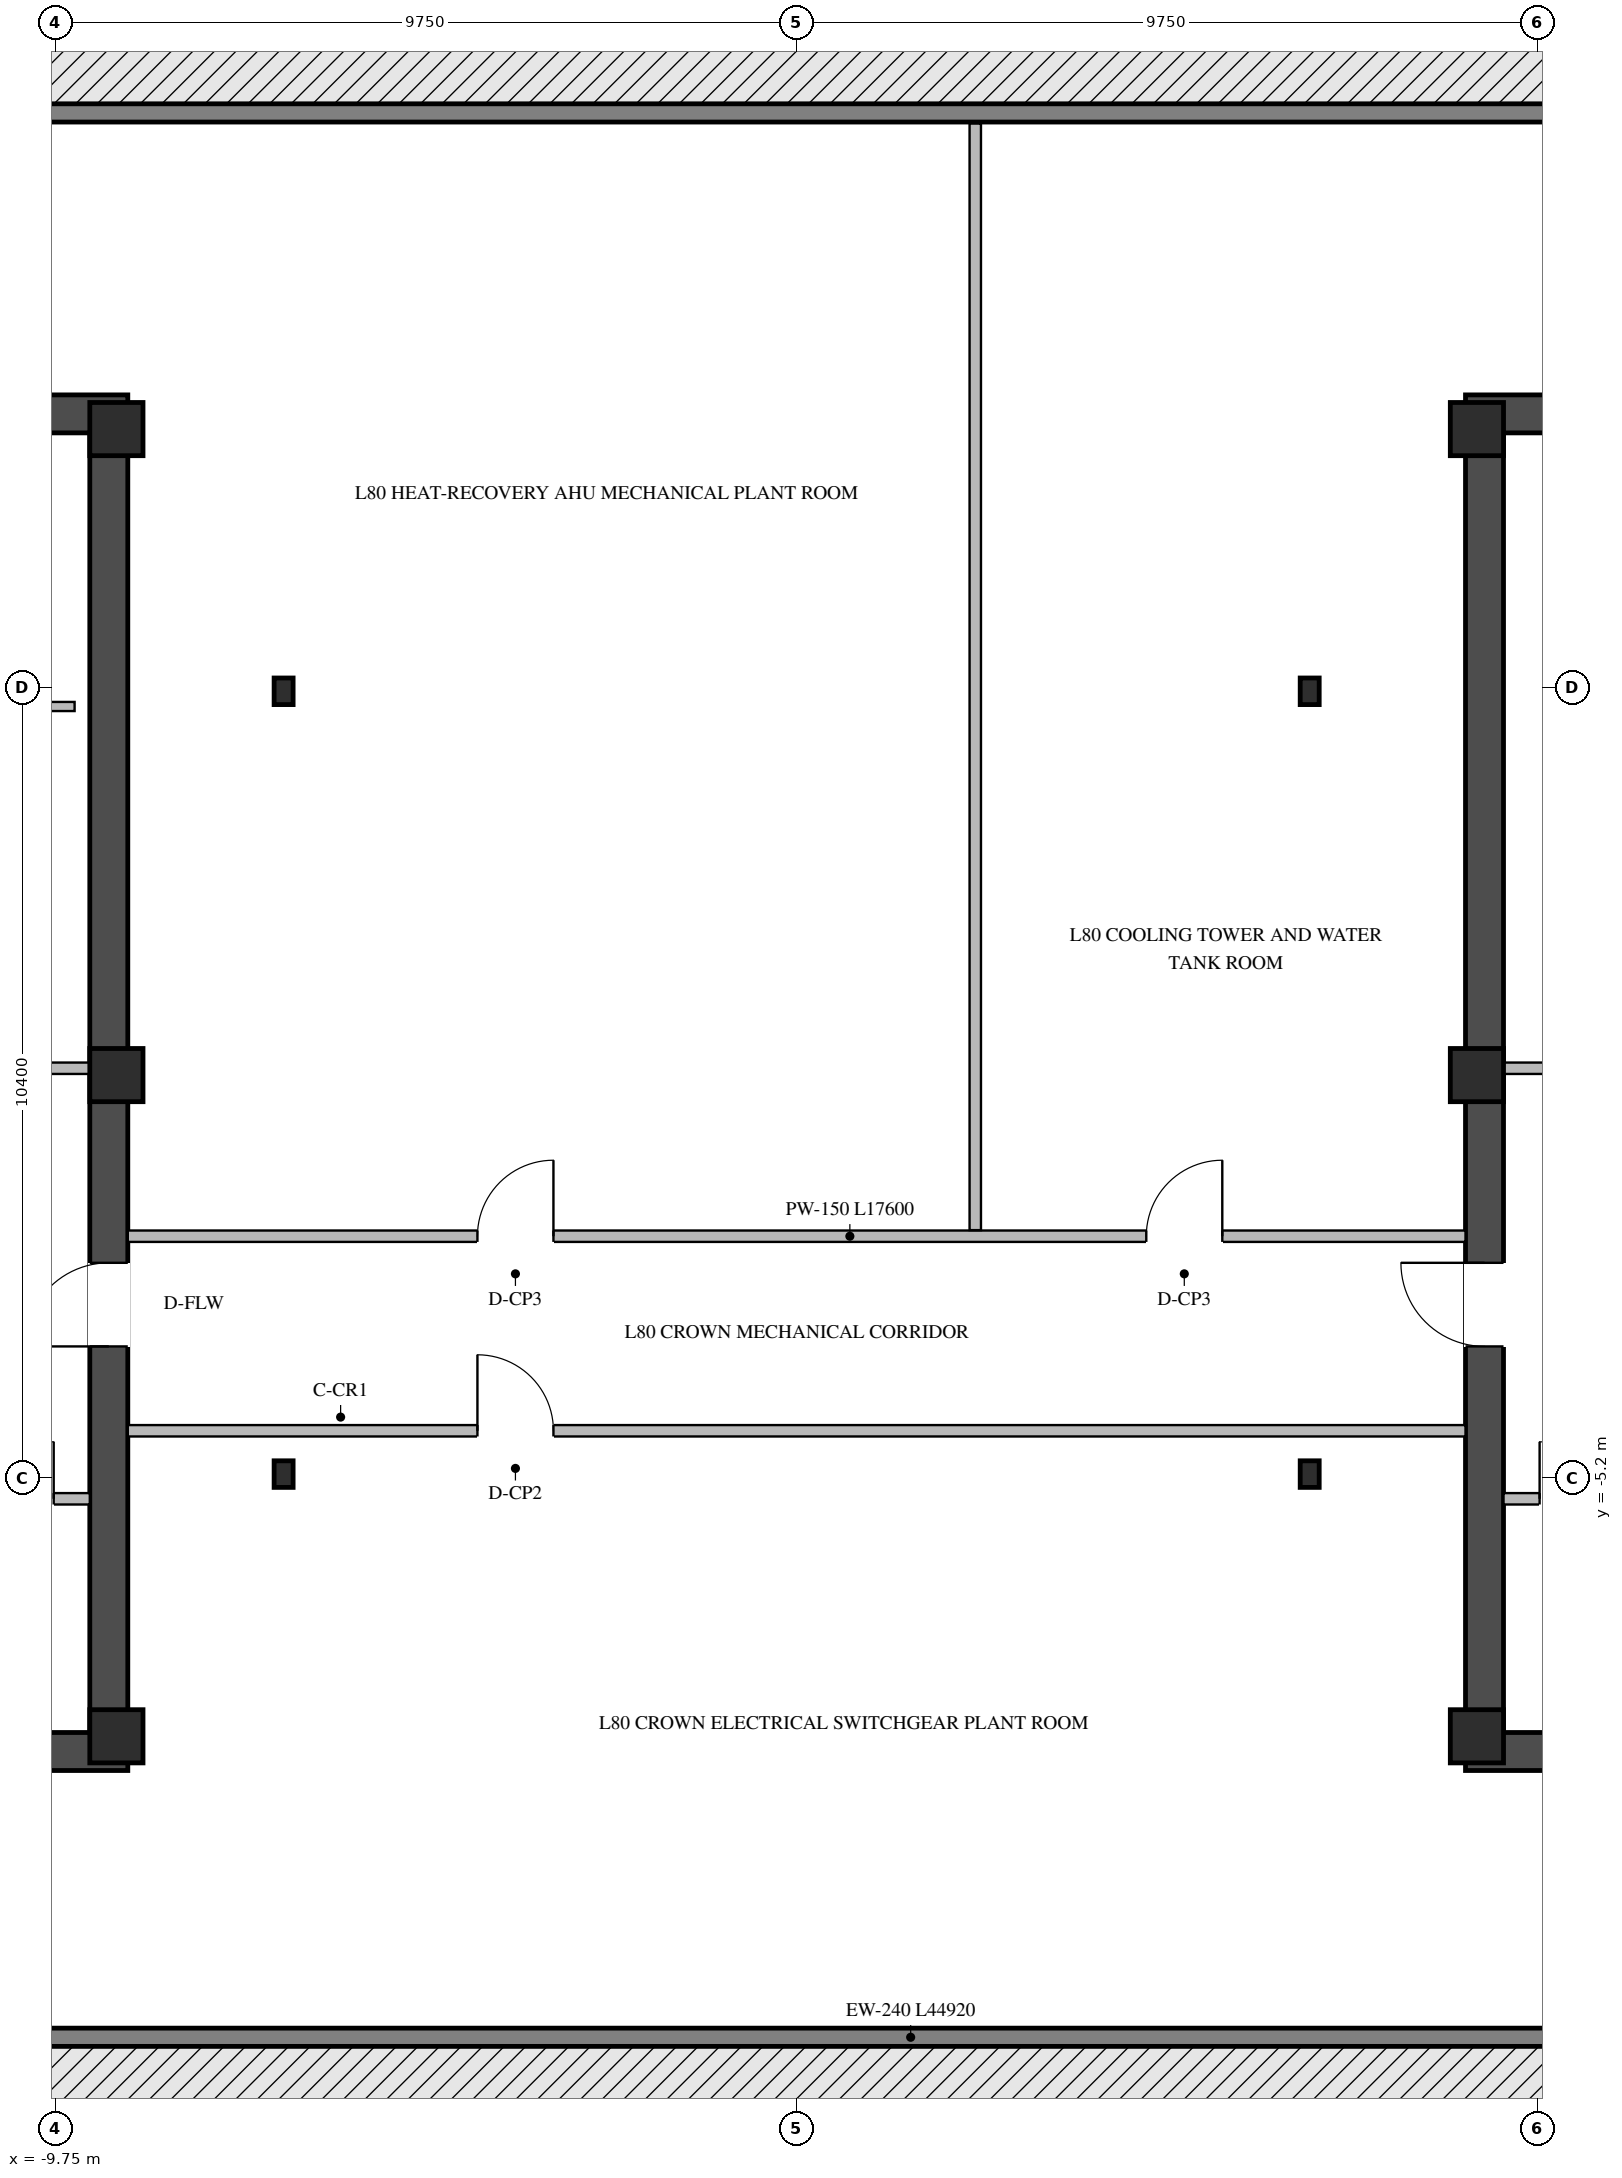
"""IFC4 building model, lengths in metres.
Left out: names, types, materials, properties, quantities, classifications, styles, units other than length and angle.
Written with IfcOpenShell. Run it as: python <this file> out.ifc"""

import sys

from ifc_helpers import new_model, si_unit, direction, frame, frame_2d, origin, origin_2d, place, context, subcontext, project, spatial, rectangle, i_section, extrude, element, fill, save


model = new_model("IFC4")
c1 = context("Model", 3, precision=1e-05, world=origin(), true_north=direction((0.0, 1.0)))
c2 = subcontext(c1, "Body", "Model", "MODEL_VIEW")
j1 = project(units=[si_unit("LENGTHUNIT", "METRE"), si_unit("PLANEANGLEUNIT", "RADIAN")], contexts=[c1])
p1 = place(None, origin())
s1 = spatial("IfcSite", under=j1, at=p1, CompositionType="ELEMENT")
p2 = place(p1, origin())
s2 = spatial("IfcBuilding", under=s1, at=p2, CompositionType="ELEMENT")
p3 = place(p2, frame((0.0, 0.0, 294.15)))
s3 = spatial("IfcBuildingStorey", under=s2, at=p3, CompositionType="ELEMENT", Elevation=294.15)
for number, where, z_axis, x_axis in (
    (1, (-19.05, -8.8, 0.0), (0.0, 0.0, 1.0), (1.0, 0.0, 0.0)),
    (2, (-19.05, 8.8, 0.0), (0.0, 0.0, 1.0), (1.0, 0.0, 0.0)),
):
    element("IfcWall", number, at=place(p3, frame(where, z_axis=z_axis, x_axis=x_axis)), inside=s3, PredefinedType="SHEAR", context=c2, shape_type="SweptSolid", body=[
        extrude(rectangle(XDim=10.25, YDim=0.5, at=frame_2d((5.125, 0.0))), origin(), (0.0, 0.0, 1.0), 3.35),
    ])
p4 = place(p3, frame((-9.05, -8.55, 0.0), z_axis=(0.0, 0.0, 1.0), x_axis=(0.0, 1.0, 0.0)))
e3 = element("IfcWall", 3, at=p4, inside=s3, PredefinedType="SHEAR", context=c2, shape_type="SweptSolid", body=[
    extrude(rectangle(XDim=17.1, YDim=0.5, at=frame_2d((8.55, 0.0))), origin(), (0.0, 0.0, 1.0), 3.35),
])
p5 = place(p4, frame((5.08, 0.0, 0.0)))
e4 = element("IfcOpeningElement", 4, at=p5, cuts=e3, PredefinedType="OPENING", context=c2, shape_type="SweptSolid", body=[
    extrude(rectangle(XDim=1.1, YDim=2.08, at=frame_2d((0.55, 1.04))), frame((0.0, 0.26, 0.0), z_axis=(0.0, -1.0, 0.0), x_axis=(1.0, 0.0, 0.0)), (0.0, 0.0, 1.0), 0.52),
])
for number, where, z_axis, x_axis in (
    (5, (8.8, -8.8, 0.0), (0.0, 0.0, 1.0), (1.0, 0.0, 0.0)),
    (6, (8.8, 8.8, 0.0), (0.0, 0.0, 1.0), (1.0, 0.0, 0.0)),
):
    element("IfcWall", number, at=place(p3, frame(where, z_axis=z_axis, x_axis=x_axis)), inside=s3, PredefinedType="SHEAR", context=c2, shape_type="SweptSolid", body=[
        extrude(rectangle(XDim=10.25, YDim=0.5, at=frame_2d((5.125, 0.0))), origin(), (0.0, 0.0, 1.0), 3.35),
    ])
p6 = place(p3, frame((9.05, -8.55, 0.0), z_axis=(0.0, 0.0, 1.0), x_axis=(0.0, 1.0, 0.0)))
e7 = element("IfcWall", 7, at=p6, inside=s3, PredefinedType="SHEAR", context=c2, shape_type="SweptSolid", body=[
    extrude(rectangle(XDim=17.1, YDim=0.5, at=frame_2d((8.55, 0.0))), origin(), (0.0, 0.0, 1.0), 3.35),
])
p7 = place(p6, frame((5.08, 0.0, 0.0)))
e8 = element("IfcOpeningElement", 8, at=p7, cuts=e7, PredefinedType="OPENING", context=c2, shape_type="SweptSolid", body=[
    extrude(rectangle(XDim=1.1, YDim=2.08, at=frame_2d((0.55, 1.04))), frame((0.0, 0.26, 0.0), z_axis=(0.0, -1.0, 0.0), x_axis=(1.0, 0.0, 0.0)), (0.0, 0.0, 1.0), 0.52),
])
for number, where, z_axis, x_axis in (
    (9, (-8.95, -8.6, 0.0), (0.0, 0.0, 1.0), (1.0, 0.0, 0.0)),
    (10, (-8.95, 0.1, 0.0), (0.0, 0.0, 1.0), (1.0, 0.0, 0.0)),
    (11, (-8.95, 8.6, 0.0), (0.0, 0.0, 1.0), (1.0, 0.0, 0.0)),
    (12, (8.95, -8.6, 0.0), (0.0, 0.0, 1.0), (1.0, 0.0, 0.0)),
    (13, (8.95, 0.1, 0.0), (0.0, 0.0, 1.0), (1.0, 0.0, 0.0)),
    (14, (8.95, 8.6, 0.0), (0.0, 0.0, 1.0), (1.0, 0.0, 0.0)),
):
    element("IfcColumn", number, at=place(p3, frame(where, z_axis=z_axis, x_axis=x_axis)), inside=s3, PredefinedType="COLUMN", context=c2, shape_type="SweptSolid", body=[
        extrude(rectangle(XDim=0.7, YDim=0.7, at=origin_2d()), origin(), (0.0, 0.0, 1.0), 3.6),
    ])
for number, where, z_axis, x_axis in (
    (15, (-6.75, -5.15, 0.0), (0.0, 0.0, 1.0), (1.0, 0.0, 0.0)),
    (16, (-6.75, 5.15, 0.0), (0.0, 0.0, 1.0), (1.0, 0.0, 0.0)),
    (17, (6.75, -5.15, 0.0), (0.0, 0.0, 1.0), (1.0, 0.0, 0.0)),
    (18, (6.75, 5.15, 0.0), (0.0, 0.0, 1.0), (1.0, 0.0, 0.0)),
):
    element("IfcColumn", number, at=place(p3, frame(where, z_axis=z_axis, x_axis=x_axis)), inside=s3, PredefinedType="COLUMN", context=c2, shape_type="SweptSolid", body=[
        extrude(i_section(OverallWidth=0.25, OverallDepth=0.35, WebThickness=0.01, FlangeThickness=0.012, at=origin_2d()), origin(), (0.0, 0.0, 1.0), 3.6),
    ])
for number, where, z_axis, x_axis in (
    (19, (-20.96, -12.56, 0.0), (0.0, 0.0, 1.0), (1.0, 0.0, 0.0)),
    (20, (23.96, 12.76, 0.0), (0.0, 0.0, 1.0), (-1.0, 0.0, 0.0)),
):
    element("IfcWall", number, at=place(p3, frame(where, z_axis=z_axis, x_axis=x_axis)), inside=s3, PredefinedType="STANDARD", context=c2, shape_type="SweptSolid", body=[
        extrude(rectangle(XDim=44.92, YDim=0.24, at=frame_2d((22.46, 0.0))), origin(), (0.0, 0.0, 1.0), 3.33),
    ])
p8 = place(p3, frame((-12.895, -5.475, 0.0), z_axis=(0.0, 0.0, 1.0), x_axis=(1.0, 0.0, 0.0)))
e21 = element("IfcWall", 21, at=p8, inside=s3, PredefinedType="STANDARD", context=c2, shape_type="SweptSolid", body=[
    extrude(rectangle(XDim=3.595, YDim=0.15, at=frame_2d((1.797, 0.0))), origin(), (0.0, 0.0, 1.0), 3.33),
])
p9 = place(p8, frame((0.42, 0.0, 0.0)))
e22 = element("IfcOpeningElement", 22, at=p9, cuts=e21, PredefinedType="OPENING", context=c2, shape_type="SweptSolid", body=[
    extrude(rectangle(XDim=1.1, YDim=2.15, at=frame_2d((0.55, 1.075))), frame((0.0, 0.085, 0.0), z_axis=(0.0, -1.0, 0.0), x_axis=(1.0, 0.0, 0.0)), (0.0, 0.0, 1.0), 0.17),
])
p10 = place(p8, frame((2.37, 0.0, 0.0)))
e23 = element("IfcOpeningElement", 23, at=p10, cuts=e21, PredefinedType="OPENING", context=c2, shape_type="SweptSolid", body=[
    extrude(rectangle(XDim=0.75, YDim=2.05, at=frame_2d((0.375, 1.025))), frame((0.0, 0.085, 0.0), z_axis=(0.0, -1.0, 0.0), x_axis=(1.0, 0.0, 0.0)), (0.0, 0.0, 1.0), 0.17),
])
p11 = place(p3, frame((-12.89, 0.19, 0.0), z_axis=(0.0, 0.0, 1.0), x_axis=(1.0, 0.0, 0.0)))
e24 = element("IfcWall", 24, at=p11, inside=s3, PredefinedType="STANDARD", context=c2, shape_type="SweptSolid", body=[
    extrude(rectangle(XDim=3.59, YDim=0.15, at=frame_2d((1.795, 0.0))), origin(), (0.0, 0.0, 1.0), 2.825),
])
p12 = place(p11, frame((0.415, 0.0, 0.0)))
e25 = element("IfcOpeningElement", 25, at=p12, cuts=e24, PredefinedType="OPENING", context=c2, shape_type="SweptSolid", body=[
    extrude(rectangle(XDim=0.85, YDim=2.04, at=frame_2d((0.425, 1.02))), frame((0.0, 0.085, 0.0), z_axis=(0.0, -1.0, 0.0), x_axis=(1.0, 0.0, 0.0)), (0.0, 0.0, 1.0), 0.17),
])
p13 = place(p3, frame((-11.05, 4.95, 0.0), z_axis=(0.0, 0.0, 1.0), x_axis=(1.0, 0.0, 0.0)))
e26 = element("IfcWall", 26, at=p13, inside=s3, PredefinedType="STANDARD", context=c2, shape_type="SweptSolid", body=[
    extrude(rectangle(XDim=1.55, YDim=0.12, at=frame_2d((0.775, 0.0))), origin(), (0.0, 0.0, 1.0), 3.33),
])
p14 = place(p3, frame((9.3, -5.475, 0.0), z_axis=(0.0, 0.0, 1.0), x_axis=(1.0, 0.0, 0.0)))
e27 = element("IfcWall", 27, at=p14, inside=s3, PredefinedType="STANDARD", context=c2, shape_type="SweptSolid", body=[
    extrude(rectangle(XDim=3.595, YDim=0.15, at=frame_2d((1.797, 0.0))), origin(), (0.0, 0.0, 1.0), 3.33),
])
p15 = place(p14, frame((2.075, 0.0, 0.0)))
e28 = element("IfcOpeningElement", 28, at=p15, cuts=e27, PredefinedType="OPENING", context=c2, shape_type="SweptSolid", body=[
    extrude(rectangle(XDim=1.1, YDim=2.15, at=frame_2d((0.55, 1.075))), frame((0.0, 0.085, 0.0), z_axis=(0.0, -1.0, 0.0), x_axis=(1.0, 0.0, 0.0)), (0.0, 0.0, 1.0), 0.17),
])
p16 = place(p14, frame((0.475, 0.0, 0.0)))
e29 = element("IfcOpeningElement", 29, at=p16, cuts=e27, PredefinedType="OPENING", context=c2, shape_type="SweptSolid", body=[
    extrude(rectangle(XDim=0.75, YDim=2.05, at=frame_2d((0.375, 1.025))), frame((0.0, 0.085, 0.0), z_axis=(0.0, -1.0, 0.0), x_axis=(1.0, 0.0, 0.0)), (0.0, 0.0, 1.0), 0.17),
])
p17 = place(p3, frame((9.3, 0.19, 0.0), z_axis=(0.0, 0.0, 1.0), x_axis=(1.0, 0.0, 0.0)))
e30 = element("IfcWall", 30, at=p17, inside=s3, PredefinedType="STANDARD", context=c2, shape_type="SweptSolid", body=[
    extrude(rectangle(XDim=3.59, YDim=0.15, at=frame_2d((1.795, 0.0))), origin(), (0.0, 0.0, 1.0), 2.825),
])
p18 = place(p17, frame((2.325, 0.0, 0.0)))
e31 = element("IfcOpeningElement", 31, at=p18, cuts=e30, PredefinedType="OPENING", context=c2, shape_type="SweptSolid", body=[
    extrude(rectangle(XDim=0.85, YDim=2.04, at=frame_2d((0.425, 1.02))), frame((0.0, 0.085, 0.0), z_axis=(0.0, -1.0, 0.0), x_axis=(1.0, 0.0, 0.0)), (0.0, 0.0, 1.0), 0.17),
])
p19 = place(p3, frame((-8.8, -2.02, 0.0), z_axis=(0.0, 0.0, 1.0), x_axis=(1.0, 0.0, 0.0)))
e32 = element("IfcWall", 32, at=p19, inside=s3, PredefinedType="STANDARD", context=c2, shape_type="SweptSolid", body=[
    extrude(rectangle(XDim=17.6, YDim=0.15, at=frame_2d((8.8, 0.0))), origin(), (0.0, 0.0, 1.0), 3.33),
])
p20 = place(p19, frame((4.6, 0.0, 0.0)))
e33 = element("IfcOpeningElement", 33, at=p20, cuts=e32, PredefinedType="OPENING", context=c2, shape_type="SweptSolid", body=[
    extrude(rectangle(XDim=1.0, YDim=2.02, at=frame_2d((0.5, 1.01))), frame((0.0, 0.085, 0.0), z_axis=(0.0, -1.0, 0.0), x_axis=(1.0, 0.0, 0.0)), (0.0, 0.0, 1.0), 0.17),
])
p21 = place(p19, frame((13.4, 0.0, 0.0)))
e34 = element("IfcOpeningElement", 34, at=p21, cuts=e32, PredefinedType="OPENING", context=c2, shape_type="SweptSolid", body=[
    extrude(rectangle(XDim=1.0, YDim=2.02, at=frame_2d((0.5, 1.01))), frame((0.0, 0.085, 0.0), z_axis=(0.0, -1.0, 0.0), x_axis=(1.0, 0.0, 0.0)), (0.0, 0.0, 1.0), 0.17),
])
p22 = place(p3, frame((2.35, -1.94, 0.0), z_axis=(0.0, 0.0, 1.0), x_axis=(0.0, 1.0, 0.0)))
e35 = element("IfcWall", 35, at=p22, inside=s3, PredefinedType="STANDARD", context=c2, shape_type="SweptSolid", body=[
    extrude(rectangle(XDim=14.56, YDim=0.15, at=frame_2d((7.28, 0.0))), origin(), (0.0, 0.0, 1.0), 3.33),
])
p23 = place(p3, frame((-8.8, -4.58, 0.0), z_axis=(0.0, 0.0, 1.0), x_axis=(1.0, 0.0, 0.0)))
e36 = element("IfcWall", 36, at=p23, inside=s3, PredefinedType="STANDARD", context=c2, shape_type="SweptSolid", body=[
    extrude(rectangle(XDim=17.6, YDim=0.15, at=frame_2d((8.8, 0.0))), origin(), (0.0, 0.0, 1.0), 3.33),
])
p24 = place(p23, frame((4.6, 0.0, 0.0)))
e37 = element("IfcOpeningElement", 37, at=p24, cuts=e36, PredefinedType="OPENING", context=c2, shape_type="SweptSolid", body=[
    extrude(rectangle(XDim=1.0, YDim=2.02, at=frame_2d((0.5, 1.01))), frame((0.0, 0.085, 0.0), z_axis=(0.0, -1.0, 0.0), x_axis=(1.0, 0.0, 0.0)), (0.0, 0.0, 1.0), 0.17),
])
p25 = place(p10, origin())
e38 = element("IfcDoor", 38, at=p25, inside=s3, OperationType="SINGLE_SWING_RIGHT", PredefinedType="DOOR", context=c2, shape_type="SweptSolid", body=[
    extrude(rectangle(XDim=0.75, YDim=2.05, at=frame_2d((0.375, 1.025))), frame((0.0, 0.025, 0.0), z_axis=(0.0, -1.0, 0.0), x_axis=(1.0, 0.0, 0.0)), (0.0, 0.0, 1.0), 0.05),
])
fill(e23, e38)
p26 = place(p5, origin())
e39 = element("IfcDoor", 39, at=p26, inside=s3, OperationType="SINGLE_SWING_LEFT", PredefinedType="DOOR", context=c2, shape_type="SweptSolid", body=[
    extrude(rectangle(XDim=1.1, YDim=2.08, at=frame_2d((0.55, 1.04))), frame((0.0, 0.205, 0.0), z_axis=(0.0, -1.0, 0.0), x_axis=(1.0, 0.0, 0.0)), (0.0, 0.0, 1.0), 0.05),
])
fill(e4, e39)
p27 = place(p16, origin())
e40 = element("IfcDoor", 40, at=p27, inside=s3, OperationType="SINGLE_SWING_LEFT", PredefinedType="DOOR", context=c2, shape_type="SweptSolid", body=[
    extrude(rectangle(XDim=0.75, YDim=2.05, at=frame_2d((0.375, 1.025))), frame((0.0, 0.025, 0.0), z_axis=(0.0, -1.0, 0.0), x_axis=(1.0, 0.0, 0.0)), (0.0, 0.0, 1.0), 0.05),
])
fill(e29, e40)
p28 = place(p7, origin())
e41 = element("IfcDoor", 41, at=p28, inside=s3, OperationType="SINGLE_SWING_RIGHT", PredefinedType="DOOR", context=c2, shape_type="SweptSolid", body=[
    extrude(rectangle(XDim=1.1, YDim=2.08, at=frame_2d((0.55, 1.04))), frame((0.0, -0.155, 0.0), z_axis=(0.0, -1.0, 0.0), x_axis=(1.0, 0.0, 0.0)), (0.0, 0.0, 1.0), 0.05),
])
fill(e8, e41)
p29 = place(p20, origin())
e42 = element("IfcDoor", 42, at=p29, inside=s3, OperationType="SINGLE_SWING_RIGHT", PredefinedType="DOOR", context=c2, shape_type="SweptSolid", body=[
    extrude(rectangle(XDim=1.0, YDim=2.02, at=frame_2d((0.5, 1.01))), frame((0.0, 0.025, 0.0), z_axis=(0.0, -1.0, 0.0), x_axis=(1.0, 0.0, 0.0)), (0.0, 0.0, 1.0), 0.05),
])
fill(e33, e42)
p30 = place(p21, origin())
e43 = element("IfcDoor", 43, at=p30, inside=s3, OperationType="SINGLE_SWING_RIGHT", PredefinedType="DOOR", context=c2, shape_type="SweptSolid", body=[
    extrude(rectangle(XDim=1.0, YDim=2.02, at=frame_2d((0.5, 1.01))), frame((0.0, 0.025, 0.0), z_axis=(0.0, -1.0, 0.0), x_axis=(1.0, 0.0, 0.0)), (0.0, 0.0, 1.0), 0.05),
])
fill(e34, e43)
p31 = place(p24, origin())
e44 = element("IfcDoor", 44, at=p31, inside=s3, OperationType="SINGLE_SWING_LEFT", PredefinedType="DOOR", context=c2, shape_type="SweptSolid", body=[
    extrude(rectangle(XDim=1.0, YDim=2.02, at=frame_2d((0.5, 1.01))), frame((0.0, 0.025, 0.0), z_axis=(0.0, -1.0, 0.0), x_axis=(1.0, 0.0, 0.0)), (0.0, 0.0, 1.0), 0.05),
])
fill(e37, e44)
save(model, sys.argv[1])
